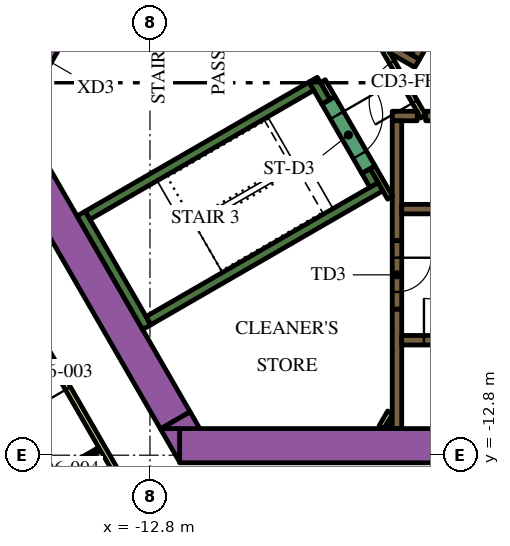
"""IFC4 building model, lengths in metres.
Left out: names, types, materials, properties, quantities, classifications, styles, units other than length and angle.
Written with IfcOpenShell. Run it as: python <this file> out.ifc"""

import sys

from ifc_helpers import new_model, si_unit, direction, frame, frame_2d, origin, place, context, subcontext, project, spatial, polyline, rectangle, outline, extrude, element, fill, save


model = new_model("IFC4")
c1 = context("Model", 3, precision=1e-05, world=origin(), true_north=direction((0.0, 1.0)))
c2 = subcontext(c1, "Body", "Model", "MODEL_VIEW")
j1 = project(units=[si_unit("LENGTHUNIT", "METRE"), si_unit("PLANEANGLEUNIT", "RADIAN")], contexts=[c1])
p1 = place(None, origin())
s1 = spatial("IfcSite", under=j1, at=p1, CompositionType="ELEMENT")
p2 = place(p1, origin())
s2 = spatial("IfcBuilding", under=s1, at=p2, CompositionType="ELEMENT")
p3 = place(p2, frame((0.0, 0.0, 91.5)))
s3 = spatial("IfcBuildingStorey", under=s2, at=p3, CompositionType="ELEMENT", Elevation=91.5)
p4 = place(p3, frame((-12.019, -12.55, 0.0), z_axis=(0.0, 0.0, 1.0), x_axis=(1.0, 0.0, 0.0)))
e1 = element("IfcWall", 1, at=p4, inside=s3, PredefinedType="SOLIDWALL", context=c2, shape_type="SweptSolid", body=[
    extrude(rectangle(XDim=21.63, YDim=0.9, at=frame_2d((10.815, 0.0))), origin(), (0.0, 0.0, 1.0), 3.9),
])
p5 = place(p3, origin())
e2 = element("IfcWall", 2, at=p5, inside=s3, PredefinedType="SOLIDWALL", context=c2, shape_type="SweptSolid", body=[
    extrude(outline(polyline([(-12.529, -12.1), (-12.021, -12.1), (-12.021, -12.98), (-12.529, -12.1)])), origin(), (0.0, 0.0, 1.0), 3.9),
])
p6 = place(p3, frame((-12.134, -11.883, 0.0), z_axis=(0.0, 0.0, 1.0), x_axis=(-0.500005339912, 0.866022320763, 0.0)))
e3 = element("IfcWall", 3, at=p6, inside=s3, PredefinedType="SOLIDWALL", context=c2, shape_type="SweptSolid", body=[
    extrude(rectangle(XDim=9.488, YDim=0.9, at=frame_2d((4.744, 0.0))), origin(), (0.0, 0.0, 1.0), 3.9),
])
e4 = element("IfcWall", 4, at=p5, inside=s3, PredefinedType="SOLIDWALL", context=c2, shape_type="SweptSolid", body=[
    extrude(outline(polyline([(-11.489, -12.1), (-12.505, -12.1), (-11.743, -11.66), (-11.489, -12.1)])), origin(), (0.0, 0.0, 1.0), 3.9),
])
p7 = place(p3, frame((-12.885, -9.431, 0.0), z_axis=(0.0, 0.0, 1.0), x_axis=(-0.500020560727, 0.866013532718, 0.0)))
e5 = element("IfcWall", 5, at=p7, inside=s3, PredefinedType="SOLIDWALL", context=c2, shape_type="SweptSolid", body=[
    extrude(rectangle(XDim=3.45, YDim=0.25, at=frame_2d((1.725, 0.0))), origin(), (0.0, 0.0, 1.0), 3.9),
])
p8 = place(p3, frame((-14.44, -6.49, 0.0), z_axis=(0.0, 0.0, 1.0), x_axis=(0.866022966069, 0.500004222222, 0.0)))
e6 = element("IfcWall", 6, at=p8, inside=s3, PredefinedType="SOLIDWALL", context=c2, shape_type="SweptSolid", body=[
    extrude(rectangle(XDim=6.8, YDim=0.25, at=frame_2d((3.4, 0.0))), origin(), (0.0, 0.0, 1.0), 3.9),
])
p9 = place(p3, frame((-8.168, -3.503, 0.0), z_axis=(0.0, 0.0, 1.0), x_axis=(-0.499952099219, 0.866053057547, 0.0)))
e7 = element("IfcWall", 7, at=p9, inside=s3, PredefinedType="SOLIDWALL", context=c2, shape_type="SweptSolid", body=[
    extrude(rectangle(XDim=0.675, YDim=0.25, at=frame_2d((0.337, 0.0))), origin(), (0.0, 0.0, 1.0), 3.9),
])
p10 = place(p3, frame((-12.84, -9.261, 0.0), z_axis=(0.0, 0.0, 1.0), x_axis=(0.866016039709, 0.500016218704, 0.0)))
e8 = element("IfcWall", 8, at=p10, inside=s3, PredefinedType="SOLIDWALL", context=c2, shape_type="SweptSolid", body=[
    extrude(rectangle(XDim=7.05, YDim=0.25, at=frame_2d((3.525, 0.0))), origin(), (0.0, 0.0, 1.0), 3.9),
])
p11 = place(p3, frame((-6.905, -5.69, 0.0), z_axis=(0.0, 0.0, 1.0), x_axis=(-0.500402024738, 0.865793170242, 0.0)))
e9 = element("IfcWall", 9, at=p11, inside=s3, PredefinedType="SOLIDWALL", context=c2, shape_type="SweptSolid", body=[
    extrude(rectangle(XDim=0.425, YDim=0.25, at=frame_2d((0.212, 0.0))), origin(), (0.0, 0.0, 1.0), 3.9),
])
p12 = place(p3, frame((-6.3, -12.1, 0.0), z_axis=(0.0, 0.0, 1.0), x_axis=(0.0, 1.0, 0.0)))
e10 = element("IfcWall", 10, at=p12, inside=s3, PredefinedType="SOLIDWALL", context=c2, shape_type="SweptSolid", body=[
    extrude(rectangle(XDim=3.146, YDim=0.25, at=frame_2d((1.573, 0.0))), origin(), (0.0, 0.0, 1.0), 3.9),
])
p13 = place(p3, frame((-5.545, -3.875, 0.0), z_axis=(0.0, 0.0, 1.0), x_axis=(1.0, 0.0, 0.0)))
e11 = element("IfcWall", 11, at=p13, inside=s3, PredefinedType="SOLIDWALL", context=c2, shape_type="SweptSolid", body=[
    extrude(rectangle(XDim=11.97, YDim=0.25, at=frame_2d((5.985, 0.0))), origin(), (0.0, 0.0, 1.0), 3.9),
])
p14 = place(p3, frame((-6.425, -3.875, 0.0), z_axis=(0.0, 0.0, 1.0), x_axis=(1.0, 0.0, 0.0)))
e12 = element("IfcWall", 12, at=p14, inside=s3, PredefinedType="SOLIDWALL", context=c2, shape_type="SweptSolid", body=[
    extrude(rectangle(XDim=0.658, YDim=0.25, at=frame_2d((0.329, 0.0))), origin(), (0.0, 0.0, 1.0), 3.9),
])
p15 = place(p3, frame((-6.3, -4.0, 0.0), z_axis=(0.0, 0.0, 1.0), x_axis=(0.0, -1.0, 0.0)))
e13 = element("IfcWall", 13, at=p15, inside=s3, PredefinedType="SOLIDWALL", context=c2, shape_type="SweptSolid", body=[
    extrude(rectangle(XDim=3.154, YDim=0.25, at=frame_2d((1.577, 0.0))), origin(), (0.0, 0.0, 1.0), 3.9),
])
e14 = element("IfcWall", 14, at=p5, inside=s3, PredefinedType="SOLIDWALL", context=c2, shape_type="SweptSolid", body=[
    extrude(outline(polyline([(-5.922, -2.257), (-5.922, -2.257), (-5.705, -2.382), (-5.83, -2.598), (-6.483, -2.221), (-6.591, -2.033), (-6.591, -2.033), (-6.7, -2.096), (-7.952, -1.373), (-7.827, -1.156), (-5.922, -2.257)])), origin(), (0.0, 0.0, 1.0), 3.9),
])
p16 = place(p3, frame((-6.708, -12.068, 0.0), z_axis=(0.0, 0.0, 1.0), x_axis=(0.500000789788, 0.8660249478, 0.0)))
e15 = element("IfcWall", 15, at=p16, inside=s3, PredefinedType="PARTITIONING", context=c2, shape_type="SweptSolid", body=[
    extrude(rectangle(XDim=0.456, YDim=0.15, at=frame_2d((0.228, 0.0))), origin(), (0.0, 0.0, 1.0), 2.75),
])
p17 = place(p3, frame((-6.534, -12.068, 0.0), z_axis=(0.0, 0.0, 1.0), x_axis=(0.500240224089, 0.865886665912, 0.0)))
e16 = element("IfcWall", 16, at=p17, inside=s3, PredefinedType="PARTITIONING", context=c2, shape_type="SweptSolid", body=[
    extrude(rectangle(XDim=0.109, YDim=0.15, at=frame_2d((0.054, 0.0))), origin(), (0.0, 0.0, 1.0), 2.75),
])
p18 = place(p3, frame((-6.48, -6.027, 0.0), z_axis=(0.0, 0.0, 1.0), x_axis=(-0.499927229454, 0.866067413802, 0.0)))
e17 = element("IfcWall", 17, at=p18, inside=s3, PredefinedType="PARTITIONING", context=c2, shape_type="SweptSolid", body=[
    extrude(rectangle(XDim=0.929, YDim=0.15, at=frame_2d((0.464, 0.0))), origin(), (0.0, 0.0, 1.0), 3.9),
])
p19 = place(p3, frame((-8.252, -2.958, 0.0), z_axis=(0.0, 0.0, 1.0), x_axis=(0.500174715838, -0.865924508047, 0.0)))
e18 = element("IfcWall", 18, at=p19, inside=s3, PredefinedType="PARTITIONING", context=c2, shape_type="SweptSolid", body=[
    extrude(rectangle(XDim=0.514, YDim=0.15, at=frame_2d((0.257, 0.0))), origin(), (0.0, 0.0, 1.0), 2.75),
])
p20 = place(p3, frame((-6.175, -9.775, 0.0), z_axis=(0.0, 0.0, 1.0), x_axis=(1.0, 0.0, 0.0)))
e19 = element("IfcWall", 19, at=p20, inside=s3, PredefinedType="SOLIDWALL", context=c2, shape_type="SweptSolid", body=[
    extrude(rectangle(XDim=12.35, YDim=0.25, at=frame_2d((6.175, 0.0))), origin(), (0.0, 0.0, 1.0), 3.9),
])
p21 = place(p20, frame((0.585, 0.0, 0.0)))
e20 = element("IfcOpeningElement", 20, at=p21, cuts=e19, PredefinedType="OPENING", context=c2, shape_type="SweptSolid", body=[
    extrude(rectangle(XDim=1.1, YDim=2.1, at=frame_2d((0.55, 1.05))), frame((0.0, 0.135, 0.0), z_axis=(0.0, -1.0, 0.0), x_axis=(1.0, 0.0, 0.0)), (0.0, 0.0, 1.0), 0.27),
])
p22 = place(p20, frame((3.105, 0.0, 0.0)))
e21 = element("IfcOpeningElement", 21, at=p22, cuts=e19, PredefinedType="OPENING", context=c2, shape_type="SweptSolid", body=[
    extrude(rectangle(XDim=1.1, YDim=2.1, at=frame_2d((0.55, 1.05))), frame((0.0, 0.135, 0.0), z_axis=(0.0, -1.0, 0.0), x_axis=(1.0, 0.0, 0.0)), (0.0, 0.0, 1.0), 0.27),
])
p23 = place(p20, frame((5.625, 0.0, 0.0)))
e22 = element("IfcOpeningElement", 22, at=p23, cuts=e19, PredefinedType="OPENING", context=c2, shape_type="SweptSolid", body=[
    extrude(rectangle(XDim=1.1, YDim=2.1, at=frame_2d((0.55, 1.05))), frame((0.0, 0.135, 0.0), z_axis=(0.0, -1.0, 0.0), x_axis=(1.0, 0.0, 0.0)), (0.0, 0.0, 1.0), 0.27),
])
p24 = place(p20, frame((8.145, 0.0, 0.0)))
e23 = element("IfcOpeningElement", 23, at=p24, cuts=e19, PredefinedType="OPENING", context=c2, shape_type="SweptSolid", body=[
    extrude(rectangle(XDim=1.1, YDim=2.1, at=frame_2d((0.55, 1.05))), frame((0.0, 0.135, 0.0), z_axis=(0.0, -1.0, 0.0), x_axis=(1.0, 0.0, 0.0)), (0.0, 0.0, 1.0), 0.27),
])
p25 = place(p20, frame((10.665, 0.0, 0.0)))
e24 = element("IfcOpeningElement", 24, at=p25, cuts=e19, PredefinedType="OPENING", context=c2, shape_type="SweptSolid", body=[
    extrude(rectangle(XDim=1.1, YDim=2.1, at=frame_2d((0.55, 1.05))), frame((0.0, 0.135, 0.0), z_axis=(0.0, -1.0, 0.0), x_axis=(1.0, 0.0, 0.0)), (0.0, 0.0, 1.0), 0.27),
])
p26 = place(p3, frame((-6.175, -6.325, 0.0), z_axis=(0.0, 0.0, 1.0), x_axis=(1.0, 0.0, 0.0)))
e25 = element("IfcWall", 25, at=p26, inside=s3, PredefinedType="SOLIDWALL", context=c2, shape_type="SweptSolid", body=[
    extrude(rectangle(XDim=12.35, YDim=0.25, at=frame_2d((6.175, 0.0))), origin(), (0.0, 0.0, 1.0), 3.9),
])
p27 = place(p26, frame((3.205, 0.0, 0.0)))
e26 = element("IfcOpeningElement", 26, at=p27, cuts=e25, PredefinedType="OPENING", context=c2, shape_type="SweptSolid", body=[
    extrude(rectangle(XDim=0.9, YDim=2.1, at=frame_2d((0.45, 1.05))), frame((0.0, 0.135, 0.0), z_axis=(0.0, -1.0, 0.0), x_axis=(1.0, 0.0, 0.0)), (0.0, 0.0, 1.0), 0.27),
])
p28 = place(p26, frame((8.145, 0.0, 0.0)))
e27 = element("IfcOpeningElement", 27, at=p28, cuts=e25, PredefinedType="OPENING", context=c2, shape_type="SweptSolid", body=[
    extrude(rectangle(XDim=1.1, YDim=2.1, at=frame_2d((0.55, 1.05))), frame((0.0, 0.135, 0.0), z_axis=(0.0, -1.0, 0.0), x_axis=(1.0, 0.0, 0.0)), (0.0, 0.0, 1.0), 0.27),
])
p29 = place(p26, frame((10.665, 0.0, 0.0)))
e28 = element("IfcOpeningElement", 28, at=p29, cuts=e25, PredefinedType="OPENING", context=c2, shape_type="SweptSolid", body=[
    extrude(rectangle(XDim=1.1, YDim=2.1, at=frame_2d((0.55, 1.05))), frame((0.0, 0.135, 0.0), z_axis=(0.0, -1.0, 0.0), x_axis=(1.0, 0.0, 0.0)), (0.0, 0.0, 1.0), 0.27),
])
p30 = place(p3, frame((-0.898, 6.194, 0.0), z_axis=(0.0, 0.0, 1.0), x_axis=(-0.499996202215, -0.866027596426, 0.0)))
e29 = element("IfcWall", 29, at=p30, inside=s3, PredefinedType="SOLIDWALL", context=c2, shape_type="SweptSolid", body=[
    extrude(rectangle(XDim=9.83, YDim=0.25, at=frame_2d((4.915, 0.0))), origin(), (0.0, 0.0, 1.0), 3.9),
])
p31 = place(p30, frame((0.585, 0.0, 0.0)))
e30 = element("IfcOpeningElement", 30, at=p31, cuts=e29, PredefinedType="OPENING", context=c2, shape_type="SweptSolid", body=[
    extrude(rectangle(XDim=1.1, YDim=2.1, at=frame_2d((0.55, 1.05))), frame((0.0, 0.135, 0.0), z_axis=(0.0, -1.0, 0.0), x_axis=(1.0, 0.0, 0.0)), (0.0, 0.0, 1.0), 0.27),
])
p32 = place(p30, frame((3.105, 0.0, 0.0)))
e31 = element("IfcOpeningElement", 31, at=p32, cuts=e29, PredefinedType="OPENING", context=c2, shape_type="SweptSolid", body=[
    extrude(rectangle(XDim=1.1, YDim=2.1, at=frame_2d((0.55, 1.05))), frame((0.0, 0.135, 0.0), z_axis=(0.0, -1.0, 0.0), x_axis=(1.0, 0.0, 0.0)), (0.0, 0.0, 1.0), 0.27),
])
p33 = place(p30, frame((5.625, 0.0, 0.0)))
e32 = element("IfcOpeningElement", 32, at=p33, cuts=e29, PredefinedType="OPENING", context=c2, shape_type="SweptSolid", body=[
    extrude(rectangle(XDim=1.1, YDim=2.1, at=frame_2d((0.55, 1.05))), frame((0.0, 0.135, 0.0), z_axis=(0.0, -1.0, 0.0), x_axis=(1.0, 0.0, 0.0)), (0.0, 0.0, 1.0), 0.27),
])
p34 = place(p30, frame((8.145, 0.0, 0.0)))
e33 = element("IfcOpeningElement", 33, at=p34, cuts=e29, PredefinedType="OPENING", context=c2, shape_type="SweptSolid", body=[
    extrude(rectangle(XDim=1.1, YDim=2.1, at=frame_2d((0.55, 1.05))), frame((0.0, 0.135, 0.0), z_axis=(0.0, -1.0, 0.0), x_axis=(1.0, 0.0, 0.0)), (0.0, 0.0, 1.0), 0.27),
])
p35 = place(p3, frame((-8.103, -3.466, 0.0), z_axis=(0.0, 0.0, 1.0), x_axis=(0.500078061341, -0.865980330357, 0.0)))
e34 = element("IfcWall", 34, at=p35, inside=s3, PredefinedType="SOLIDWALL", context=c2, shape_type="SweptSolid", body=[
    extrude(rectangle(XDim=2.1, YDim=0.4, at=frame_2d((1.05, 0.0))), origin(), (0.0, 0.0, 1.0), 3.9),
])
p36 = place(p35, frame((0.45, 0.0, 0.0)))
e35 = element("IfcOpeningElement", 35, at=p36, cuts=e34, PredefinedType="OPENING", context=c2, shape_type="SweptSolid", body=[
    extrude(rectangle(XDim=1.2, YDim=2.1, at=frame_2d((0.6, 1.05))), frame((0.0, 0.21, 0.0), z_axis=(0.0, -1.0, 0.0), x_axis=(1.0, 0.0, 0.0)), (0.0, 0.0, 1.0), 0.42),
])
p37 = place(p3, frame((-6.3, -7.154, 0.0), z_axis=(0.0, 0.0, 1.0), x_axis=(0.0, -1.0, 0.0)))
e36 = element("IfcWall", 36, at=p37, inside=s3, PredefinedType="SOLIDWALL", context=c2, shape_type="SweptSolid", body=[
    extrude(rectangle(XDim=1.8, YDim=0.25, at=frame_2d((0.9, 0.0))), origin(), (0.0, 0.0, 1.0), 3.9),
])
p38 = place(p37, frame((0.45, 0.0, 0.0)))
e37 = element("IfcOpeningElement", 37, at=p38, cuts=e36, PredefinedType="OPENING", context=c2, shape_type="SweptSolid", body=[
    extrude(rectangle(XDim=0.9, YDim=2.1, at=frame_2d((0.45, 1.05))), frame((0.0, 0.135, 0.0), z_axis=(0.0, -1.0, 0.0), x_axis=(1.0, 0.0, 0.0)), (0.0, 0.0, 1.0), 0.27),
])
p39 = place(p3, frame((-5.606, -3.89, 0.0), z_axis=(0.0, 0.0, 1.0), x_axis=(-0.500027713859, 0.866009402589, 0.0)))
e38 = element("IfcWall", 38, at=p39, inside=s3, PredefinedType="PARTITIONING", context=c2, shape_type="SweptSolid", body=[
    extrude(rectangle(XDim=2.1, YDim=0.15, at=frame_2d((1.05, 0.0))), origin(), (0.0, 0.0, 1.0), 2.75),
])
p40 = place(p39, frame((0.45, 0.0, 0.0)))
e39 = element("IfcOpeningElement", 39, at=p40, cuts=e38, PredefinedType="OPENING", context=c2, shape_type="SweptSolid", body=[
    extrude(rectangle(XDim=1.2, YDim=2.1, at=frame_2d((0.6, 1.05))), frame((0.0, 0.085, 0.0), z_axis=(0.0, -1.0, 0.0), x_axis=(1.0, 0.0, 0.0)), (0.0, 0.0, 1.0), 0.17),
])
p41 = place(p3, frame((-16.209, -2.976, 0.0), z_axis=(0.0, 0.0, 1.0), x_axis=(0.499954529098, 0.86605165483, 0.0)))
e40 = element("IfcWall", 40, at=p41, inside=s3, PredefinedType="SOLIDWALL", context=c2, shape_type="SweptSolid", body=[
    extrude(rectangle(XDim=1.7, YDim=0.9, at=frame_2d((0.85, 0.0))), origin(), (0.0, 0.0, 1.0), 3.9),
])
p42 = place(p41, frame((0.25, 0.0, 0.0)))
e41 = element("IfcOpeningElement", 41, at=p42, cuts=e40, PredefinedType="OPENING", context=c2, shape_type="SweptSolid", body=[
    extrude(rectangle(XDim=1.2, YDim=2.1, at=frame_2d((0.6, 1.05))), frame((0.0, 0.46, 0.0), z_axis=(0.0, -1.0, 0.0), x_axis=(1.0, 0.0, 0.0)), (0.0, 0.0, 1.0), 0.92),
])
p43 = place(p3, frame((-19.081, -3.9, 0.0), z_axis=(0.0, 0.0, 1.0), x_axis=(0.499998313975, 0.866026377209, 0.0)))
e42 = element("IfcWall", 42, at=p43, inside=s3, PredefinedType="PARTITIONING", context=c2, shape_type="SweptSolid", body=[
    extrude(rectangle(XDim=25.766, YDim=0.15, at=frame_2d((12.883, 0.0))), origin(), (0.0, 0.0, 1.0), 2.75),
])
p44 = place(p43, frame((19.306, 0.0, 0.0)))
e43 = element("IfcOpeningElement", 43, at=p44, cuts=e42, PredefinedType="OPENING", context=c2, shape_type="SweptSolid", body=[
    extrude(rectangle(XDim=1.0, YDim=2.1, at=frame_2d((0.5, 1.05))), frame((0.0, 0.085, 0.0), z_axis=(0.0, -1.0, 0.0), x_axis=(1.0, 0.0, 0.0)), (0.0, 0.0, 1.0), 0.17),
])
p45 = place(p43, frame((18.0, 0.0, 0.0)))
e44 = element("IfcOpeningElement", 44, at=p45, cuts=e42, PredefinedType="OPENING", context=c2, shape_type="SweptSolid", body=[
    extrude(rectangle(XDim=1.0, YDim=2.1, at=frame_2d((0.5, 1.05))), frame((0.0, 0.085, 0.0), z_axis=(0.0, -1.0, 0.0), x_axis=(1.0, 0.0, 0.0)), (0.0, 0.0, 1.0), 0.17),
])
p46 = place(p43, frame((10.874, 0.0, 0.0)))
e45 = element("IfcOpeningElement", 45, at=p46, cuts=e42, PredefinedType="OPENING", context=c2, shape_type="SweptSolid", body=[
    extrude(rectangle(XDim=0.9, YDim=2.1, at=frame_2d((0.45, 1.05))), frame((0.0, 0.085, 0.0), z_axis=(0.0, -1.0, 0.0), x_axis=(1.0, 0.0, 0.0)), (0.0, 0.0, 1.0), 0.17),
])
p47 = place(p43, frame((8.548, 0.0, 0.0)))
e46 = element("IfcOpeningElement", 46, at=p47, cuts=e42, PredefinedType="OPENING", context=c2, shape_type="SweptSolid", body=[
    extrude(rectangle(XDim=1.1, YDim=2.1, at=frame_2d((0.55, 1.05))), frame((0.0, 0.085, 0.0), z_axis=(0.0, -1.0, 0.0), x_axis=(1.0, 0.0, 0.0)), (0.0, 0.0, 1.0), 0.17),
])
p48 = place(p43, frame((0.18, 0.0, 0.0)))
e47 = element("IfcOpeningElement", 47, at=p48, cuts=e42, PredefinedType="OPENING", context=c2, shape_type="SweptSolid", body=[
    extrude(rectangle(XDim=1.0, YDim=2.1, at=frame_2d((0.5, 1.05))), frame((0.0, 0.085, 0.0), z_axis=(0.0, -1.0, 0.0), x_axis=(1.0, 0.0, 0.0)), (0.0, 0.0, 1.0), 0.17),
])
p49 = place(p3, frame((-12.918, -14.575, 0.0), z_axis=(0.0, 0.0, 1.0), x_axis=(-0.500009150678, 0.866020120573, 0.0)))
e48 = element("IfcWall", 48, at=p49, inside=s3, PredefinedType="PARTITIONING", context=c2, shape_type="SweptSolid", body=[
    extrude(rectangle(XDim=5.258, YDim=0.15, at=frame_2d((2.629, 0.0))), origin(), (0.0, 0.0, 1.0), 2.75),
])
p50 = place(p49, frame((4.078, 0.0, 0.0)))
e49 = element("IfcOpeningElement", 49, at=p50, cuts=e48, PredefinedType="OPENING", context=c2, shape_type="SweptSolid", body=[
    extrude(rectangle(XDim=1.0, YDim=2.1, at=frame_2d((0.5, 1.05))), frame((0.0, 0.085, 0.0), z_axis=(0.0, -1.0, 0.0), x_axis=(1.0, 0.0, 0.0)), (0.0, 0.0, 1.0), 0.17),
])
p51 = place(p3, frame((-14.123, -12.638, 0.0), z_axis=(0.0, 0.0, 1.0), x_axis=(-0.86599734893, -0.500048589285, 0.0)))
e50 = element("IfcWall", 50, at=p51, inside=s3, PredefinedType="PARTITIONING", context=c2, shape_type="SweptSolid", body=[
    extrude(rectangle(XDim=2.7, YDim=0.1, at=frame_2d((1.35, 0.0))), origin(), (0.0, 0.0, 1.0), 2.75),
])
p52 = place(p51, frame((0.6, 0.0, 0.0)))
e51 = element("IfcOpeningElement", 51, at=p52, cuts=e50, PredefinedType="OPENING", context=c2, shape_type="SweptSolid", body=[
    extrude(rectangle(XDim=0.9, YDim=2.1, at=frame_2d((0.45, 1.05))), frame((0.0, 0.06, 0.0), z_axis=(0.0, -1.0, 0.0), x_axis=(1.0, 0.0, 0.0)), (0.0, 0.0, 1.0), 0.12),
])
p53 = place(p21, origin())
e52 = element("IfcDoor", 52, at=p53, inside=s3, OperationType="DOUBLE_DOOR_SLIDING", PredefinedType="DOOR", context=c2, shape_type="SweptSolid", body=[
    extrude(rectangle(XDim=1.1, YDim=2.1, at=frame_2d((0.55, 1.05))), frame((0.0, 0.025, 0.0), z_axis=(0.0, -1.0, 0.0), x_axis=(1.0, 0.0, 0.0)), (0.0, 0.0, 1.0), 0.05),
])
fill(e20, e52)
p54 = place(p36, origin())
e53 = element("IfcDoor", 53, at=p54, inside=s3, OperationType="SINGLE_SWING_LEFT", PredefinedType="DOOR", context=c2, shape_type="SweptSolid", body=[
    extrude(rectangle(XDim=1.2, YDim=2.1, at=frame_2d((0.6, 1.05))), frame((0.0, 0.025, 0.0), z_axis=(0.0, -1.0, 0.0), x_axis=(1.0, 0.0, 0.0)), (0.0, 0.0, 1.0), 0.05),
])
fill(e35, e53)
p55 = place(p38, origin())
e54 = element("IfcDoor", 54, at=p55, inside=s3, OperationType="SINGLE_SWING_LEFT", PredefinedType="DOOR", context=c2, shape_type="SweptSolid", body=[
    extrude(rectangle(XDim=0.9, YDim=2.1, at=frame_2d((0.45, 1.05))), frame((0.0, 0.025, 0.0), z_axis=(0.0, -1.0, 0.0), x_axis=(1.0, 0.0, 0.0)), (0.0, 0.0, 1.0), 0.05),
])
fill(e37, e54)
p56 = place(p40, origin())
e55 = element("IfcDoor", 55, at=p56, inside=s3, OperationType="SINGLE_SWING_LEFT", PredefinedType="DOOR", context=c2, shape_type="SweptSolid", body=[
    extrude(rectangle(XDim=1.2, YDim=2.1, at=frame_2d((0.6, 1.05))), frame((0.0, 0.025, 0.0), z_axis=(0.0, -1.0, 0.0), x_axis=(1.0, 0.0, 0.0)), (0.0, 0.0, 1.0), 0.05),
])
fill(e39, e55)
p57 = place(p50, origin())
e56 = element("IfcDoor", 56, at=p57, inside=s3, OperationType="SINGLE_SWING_RIGHT", PredefinedType="DOOR", context=c2, shape_type="SweptSolid", body=[
    extrude(rectangle(XDim=1.0, YDim=2.1, at=frame_2d((0.5, 1.05))), frame((0.0, 0.025, 0.0), z_axis=(0.0, -1.0, 0.0), x_axis=(1.0, 0.0, 0.0)), (0.0, 0.0, 1.0), 0.05),
])
fill(e49, e56)
p58 = place(p52, origin())
e57 = element("IfcDoor", 57, at=p58, inside=s3, OperationType="SINGLE_SWING_LEFT", PredefinedType="DOOR", context=c2, shape_type="SweptSolid", body=[
    extrude(rectangle(XDim=0.9, YDim=2.1, at=frame_2d((0.45, 1.05))), frame((0.0, 0.025, 0.0), z_axis=(0.0, -1.0, 0.0), x_axis=(1.0, 0.0, 0.0)), (0.0, 0.0, 1.0), 0.05),
])
fill(e51, e57)
save(model, sys.argv[1])
